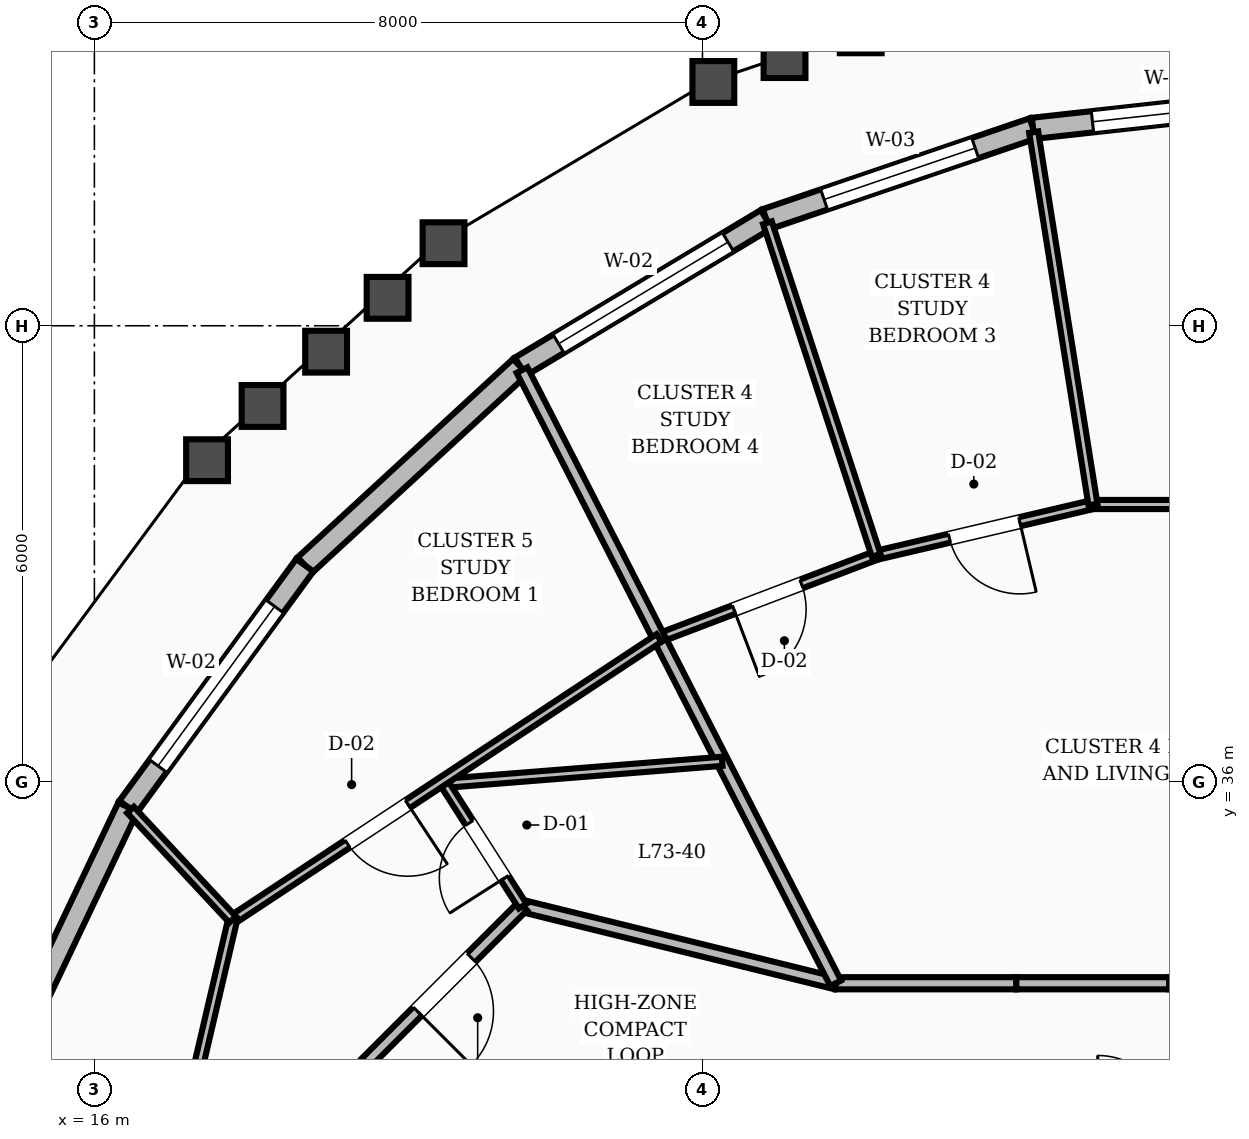
"""IFC4 building model, lengths in metres.
Left out: names, types, materials, properties, quantities, classifications, styles, units other than length and angle.
Written with IfcOpenShell. Run it as: python <this file> out.ifc"""

import sys

from ifc_helpers import new_model, si_unit, direction, frame, frame_2d, origin, place, context, subcontext, project, spatial, rectangle, extrude, element, fill, save


model = new_model("IFC4")
c1 = context("Model", 3, precision=1e-05, world=origin(), true_north=direction((0.0, 1.0)))
c2 = subcontext(c1, "Body", "Model", "MODEL_VIEW")
j1 = project(units=[si_unit("LENGTHUNIT", "METRE"), si_unit("PLANEANGLEUNIT", "RADIAN")], contexts=[c1])
p1 = place(None, origin())
s1 = spatial("IfcSite", under=j1, at=p1, CompositionType="ELEMENT")
p2 = place(p1, origin())
s2 = spatial("IfcBuilding", under=s1, at=p2, CompositionType="ELEMENT")
p3 = place(p2, frame((0.0, 0.0, 279.6)))
s3 = spatial("IfcBuildingStorey", under=s2, at=p3, CompositionType="ELEMENT", Elevation=279.6)
p4 = place(p3, frame((32.0, 45.0, 0.0), z_axis=(0.0, 0.0, 1.0), x_axis=(-0.993952444877, -0.10981137156, 0.0)))
e1 = element("IfcWall", 1, at=p4, inside=s3, PredefinedType="STANDARD", context=c2, shape_type="SweptSolid", body=[
    extrude(rectangle(XDim=3.673, YDim=0.28, at=frame_2d((1.836, 0.0))), origin(), (0.0, 0.0, 1.0), 2.88),
])
p5 = place(p4, frame((0.787, 0.0, 0.8)))
e2 = element("IfcOpeningElement", 2, at=p5, cuts=e1, PredefinedType="OPENING", context=c2, shape_type="SweptSolid", body=[
    extrude(rectangle(XDim=2.1, YDim=1.65, at=frame_2d((1.05, 0.825))), frame((0.0, 0.15, 0.0), z_axis=(0.0, -1.0, 0.0), x_axis=(1.0, 0.0, 0.0)), (0.0, 0.0, 1.0), 0.3),
])
p6 = place(p3, frame((28.349, 44.597, 0.0), z_axis=(0.0, 0.0, 1.0), x_axis=(-0.946642640744, -0.322285138854, 0.0)))
e3 = element("IfcWall", 3, at=p6, inside=s3, PredefinedType="STANDARD", context=c2, shape_type="SweptSolid", body=[
    extrude(rectangle(XDim=3.708, YDim=0.28, at=frame_2d((1.854, 0.0))), origin(), (0.0, 0.0, 1.0), 2.88),
])
p7 = place(p6, frame((0.804, 0.0, 0.8)))
e4 = element("IfcOpeningElement", 4, at=p7, cuts=e3, PredefinedType="OPENING", context=c2, shape_type="SweptSolid", body=[
    extrude(rectangle(XDim=2.1, YDim=1.65, at=frame_2d((1.05, 0.825))), frame((0.0, 0.15, 0.0), z_axis=(0.0, -1.0, 0.0), x_axis=(1.0, 0.0, 0.0)), (0.0, 0.0, 1.0), 0.3),
])
p8 = place(p3, frame((24.839, 43.402, 0.0), z_axis=(0.0, 0.0, 1.0), x_axis=(-0.857555727465, -0.514391071357, 0.0)))
e5 = element("IfcWall", 5, at=p8, inside=s3, PredefinedType="STANDARD", context=c2, shape_type="SweptSolid", body=[
    extrude(rectangle(XDim=3.773, YDim=0.28, at=frame_2d((1.886, 0.0))), origin(), (0.0, 0.0, 1.0), 2.88),
])
p9 = place(p8, frame((0.586, 0.0, 0.8)))
e6 = element("IfcOpeningElement", 6, at=p9, cuts=e5, PredefinedType="OPENING", context=c2, shape_type="SweptSolid", body=[
    extrude(rectangle(XDim=2.6, YDim=1.65, at=frame_2d((1.3, 0.825))), frame((0.0, 0.15, 0.0), z_axis=(0.0, -1.0, 0.0), x_axis=(1.0, 0.0, 0.0)), (0.0, 0.0, 1.0), 0.3),
])
p10 = place(p3, frame((21.604, 41.461, 0.0), z_axis=(0.0, 0.0, 1.0), x_axis=(-0.735545935602, -0.677474853127, 0.0)))
e7 = element("IfcWall", 7, at=p10, inside=s3, PredefinedType="STANDARD", context=c2, shape_type="SweptSolid", body=[
    extrude(rectangle(XDim=3.855, YDim=0.28, at=frame_2d((1.928, 0.0))), origin(), (0.0, 0.0, 1.0), 2.88),
])
p11 = place(p3, frame((18.768, 38.85, 0.0), z_axis=(0.0, 0.0, 1.0), x_axis=(-0.590275846693, -0.807201601095, 0.0)))
e8 = element("IfcWall", 8, at=p11, inside=s3, PredefinedType="STANDARD", context=c2, shape_type="SweptSolid", body=[
    extrude(rectangle(XDim=3.942, YDim=0.28, at=frame_2d((1.971, 0.0))), origin(), (0.0, 0.0, 1.0), 2.88),
])
p12 = place(p11, frame((0.671, 0.0, 0.8)))
e9 = element("IfcOpeningElement", 9, at=p12, cuts=e8, PredefinedType="OPENING", context=c2, shape_type="SweptSolid", body=[
    extrude(rectangle(XDim=2.6, YDim=1.65, at=frame_2d((1.3, 0.825))), frame((0.0, 0.15, 0.0), z_axis=(0.0, -1.0, 0.0), x_axis=(1.0, 0.0, 0.0)), (0.0, 0.0, 1.0), 0.3),
])
p13 = place(p3, frame((16.441, 35.667, 0.0), z_axis=(0.0, 0.0, 1.0), x_axis=(-0.430011346388, -0.902823483289, 0.0)))
e10 = element("IfcWall", 10, at=p13, inside=s3, PredefinedType="STANDARD", context=c2, shape_type="SweptSolid", body=[
    extrude(rectangle(XDim=4.021, YDim=0.28, at=frame_2d((2.011, 0.0))), origin(), (0.0, 0.0, 1.0), 2.88),
])
p14 = place(p3, frame((30.14, 33.35, 0.0), z_axis=(0.0, 0.0, 1.0), x_axis=(-1.0, 0.0, 0.0)))
e11 = element("IfcWall", 11, at=p14, inside=s3, PredefinedType="SOLIDWALL", context=c2, shape_type="SweptSolid", body=[
    extrude(rectangle(XDim=2.013, YDim=0.16, at=frame_2d((1.006, 0.0))), origin(), (0.0, 0.0, 1.0), 2.87),
])
p15 = place(p3, frame((28.127, 33.35, 0.0), z_axis=(0.0, 0.0, 1.0), x_axis=(-1.0, 0.0, 0.0)))
e12 = element("IfcWall", 12, at=p15, inside=s3, PredefinedType="SOLIDWALL", context=c2, shape_type="SweptSolid", body=[
    extrude(rectangle(XDim=2.375, YDim=0.16, at=frame_2d((1.188, 0.0))), origin(), (0.0, 0.0, 1.0), 2.87),
])
p16 = place(p3, frame((25.752, 33.35, 0.0), z_axis=(0.0, 0.0, 1.0), x_axis=(-0.970939799552, 0.239323850978, 0.0)))
e13 = element("IfcWall", 13, at=p16, inside=s3, PredefinedType="SOLIDWALL", context=c2, shape_type="SweptSolid", body=[
    extrude(rectangle(XDim=4.241, YDim=0.16, at=frame_2d((2.12, 0.0))), origin(), (0.0, 0.0, 1.0), 2.87),
])
p17 = place(p3, frame((21.635, 34.365, 0.0), z_axis=(0.0, 0.0, 1.0), x_axis=(-0.707106781187, -0.707106781187, 0.0)))
e14 = element("IfcWall", 14, at=p17, inside=s3, PredefinedType="SOLIDWALL", context=c2, shape_type="SweptSolid", body=[
    extrude(rectangle(XDim=2.916, YDim=0.16, at=frame_2d((1.458, 0.0))), origin(), (0.0, 0.0, 1.0), 2.87),
])
p18 = place(p17, frame((0.958, 0.0, 0.0)))
e15 = element("IfcOpeningElement", 15, at=p18, cuts=e14, PredefinedType="OPENING", context=c2, shape_type="SweptSolid", body=[
    extrude(rectangle(XDim=1.0, YDim=2.1, at=frame_2d((0.5, 1.05))), frame((0.0, 0.09, 0.0), z_axis=(0.0, -1.0, 0.0), x_axis=(1.0, 0.0, 0.0)), (0.0, 0.0, 1.0), 0.18),
])
p19 = place(p3, frame((34.863, 39.648, 0.0), z_axis=(0.0, 0.0, 1.0), x_axis=(-1.0, 0.0, 0.0)))
e16 = element("IfcWall", 16, at=p19, inside=s3, PredefinedType="PARTITIONING", context=c2, shape_type="SweptSolid", body=[
    extrude(rectangle(XDim=5.726, YDim=0.12, at=frame_2d((2.863, 0.0))), origin(), (0.0, 0.0, 1.0), 2.87),
])
p20 = place(p19, frame((2.388, 0.0, 0.0)))
e17 = element("IfcOpeningElement", 17, at=p20, cuts=e16, PredefinedType="OPENING", context=c2, shape_type="SweptSolid", body=[
    extrude(rectangle(XDim=0.95, YDim=2.1, at=frame_2d((0.475, 1.05))), frame((0.0, 0.07, 0.0), z_axis=(0.0, -1.0, 0.0), x_axis=(1.0, 0.0, 0.0)), (0.0, 0.0, 1.0), 0.14),
])
p21 = place(p3, frame((29.137, 39.648, 0.0), z_axis=(0.0, 0.0, 1.0), x_axis=(-0.973528560289, -0.228565400489, 0.0)))
e18 = element("IfcWall", 18, at=p21, inside=s3, PredefinedType="PARTITIONING", context=c2, shape_type="SweptSolid", body=[
    extrude(rectangle(XDim=2.929, YDim=0.12, at=frame_2d((1.464, 0.0))), origin(), (0.0, 0.0, 1.0), 2.87),
])
p22 = place(p21, frame((0.99, 0.0, 0.0)))
e19 = element("IfcOpeningElement", 19, at=p22, cuts=e18, PredefinedType="OPENING", context=c2, shape_type="SweptSolid", body=[
    extrude(rectangle(XDim=0.95, YDim=2.1, at=frame_2d((0.475, 1.05))), frame((0.0, 0.07, 0.0), z_axis=(0.0, -1.0, 0.0), x_axis=(1.0, 0.0, 0.0)), (0.0, 0.0, 1.0), 0.14),
])
p23 = place(p3, frame((29.137, 39.648, 0.0), z_axis=(0.0, 0.0, 1.0), x_axis=(-0.157236134309, 0.98756103511, 0.0)))
e20 = element("IfcWall", 20, at=p23, inside=s3, PredefinedType="PARTITIONING", context=c2, shape_type="SweptSolid", body=[
    extrude(rectangle(XDim=4.961, YDim=0.12, at=frame_2d((2.48, 0.0))), origin(), (0.0, 0.0, 1.0), 2.87),
])
p24 = place(p3, frame((26.286, 38.979, 0.0), z_axis=(0.0, 0.0, 1.0), x_axis=(-0.934660984689, -0.355540213901, 0.0)))
e21 = element("IfcWall", 21, at=p24, inside=s3, PredefinedType="PARTITIONING", context=c2, shape_type="SweptSolid", body=[
    extrude(rectangle(XDim=3.056, YDim=0.12, at=frame_2d((1.528, 0.0))), origin(), (0.0, 0.0, 1.0), 2.87),
])
p25 = place(p24, frame((1.053, 0.0, 0.0)))
e22 = element("IfcOpeningElement", 22, at=p25, cuts=e21, PredefinedType="OPENING", context=c2, shape_type="SweptSolid", body=[
    extrude(rectangle(XDim=0.95, YDim=2.1, at=frame_2d((0.475, 1.05))), frame((0.0, 0.07, 0.0), z_axis=(0.0, -1.0, 0.0), x_axis=(1.0, 0.0, 0.0)), (0.0, 0.0, 1.0), 0.14),
])
p26 = place(p3, frame((26.286, 38.979, 0.0), z_axis=(0.0, 0.0, 1.0), x_axis=(-0.310924966345, 0.95043446134, 0.0)))
e23 = element("IfcWall", 23, at=p26, inside=s3, PredefinedType="PARTITIONING", context=c2, shape_type="SweptSolid", body=[
    extrude(rectangle(XDim=4.604, YDim=0.12, at=frame_2d((2.302, 0.0))), origin(), (0.0, 0.0, 1.0), 2.87),
])
p27 = place(p3, frame((25.752, 33.35, 0.0), z_axis=(0.0, 0.0, 1.0), x_axis=(-0.455343199474, 0.890315994854, 0.0)))
e24 = element("IfcWall", 24, at=p27, inside=s3, PredefinedType="SOLIDWALL", context=c2, shape_type="SweptSolid", body=[
    extrude(rectangle(XDim=9.061, YDim=0.16, at=frame_2d((4.53, 0.0))), origin(), (0.0, 0.0, 1.0), 2.87),
])
p28 = place(p3, frame((24.259, 36.27, 0.0), z_axis=(0.0, 0.0, 1.0), x_axis=(-0.996857888432, -0.079210796423, 0.0)))
e25 = element("IfcWall", 25, at=p28, inside=s3, PredefinedType="PARTITIONING", context=c2, shape_type="SweptSolid", body=[
    extrude(rectangle(XDim=3.668, YDim=0.12, at=frame_2d((1.834, 0.0))), origin(), (0.0, 0.0, 1.0), 2.87),
])
p29 = place(p3, frame((21.635, 34.365, 0.0), z_axis=(0.0, 0.0, 1.0), x_axis=(-0.538663184237, 0.842521200889, 0.0)))
e26 = element("IfcWall", 26, at=p29, inside=s3, PredefinedType="PARTITIONING", context=c2, shape_type="SweptSolid", body=[
    extrude(rectangle(XDim=1.916, YDim=0.12, at=frame_2d((0.958, 0.0))), origin(), (0.0, 0.0, 1.0), 2.87),
])
p30 = place(p29, frame((0.44, 0.0, 0.0)))
e27 = element("IfcOpeningElement", 27, at=p30, cuts=e26, PredefinedType="OPENING", context=c2, shape_type="SweptSolid", body=[
    extrude(rectangle(XDim=0.86, YDim=2.1, at=frame_2d((0.43, 1.05))), frame((0.0, 0.07, 0.0), z_axis=(0.0, -1.0, 0.0), x_axis=(1.0, 0.0, 0.0)), (0.0, 0.0, 1.0), 0.14),
])
p31 = place(p3, frame((23.429, 37.892, 0.0), z_axis=(0.0, 0.0, 1.0), x_axis=(-0.834428061238, -0.551116875643, 0.0)))
e28 = element("IfcWall", 28, at=p31, inside=s3, PredefinedType="PARTITIONING", context=c2, shape_type="SweptSolid", body=[
    extrude(rectangle(XDim=6.723, YDim=0.12, at=frame_2d((3.362, 0.0))), origin(), (0.0, 0.0, 1.0), 2.87),
])
p32 = place(p31, frame((3.963, 0.0, 0.0)))
e29 = element("IfcOpeningElement", 29, at=p32, cuts=e28, PredefinedType="OPENING", context=c2, shape_type="SweptSolid", body=[
    extrude(rectangle(XDim=0.95, YDim=2.1, at=frame_2d((0.475, 1.05))), frame((0.0, 0.07, 0.0), z_axis=(0.0, -1.0, 0.0), x_axis=(1.0, 0.0, 0.0)), (0.0, 0.0, 1.0), 0.14),
])
p33 = place(p3, frame((17.819, 34.187, 0.0), z_axis=(0.0, 0.0, 1.0), x_axis=(-0.22738655048, -0.973804578271, 0.0)))
e30 = element("IfcWall", 30, at=p33, inside=s3, PredefinedType="PARTITIONING", context=c2, shape_type="SweptSolid", body=[
    extrude(rectangle(XDim=6.983, YDim=0.12, at=frame_2d((3.492, 0.0))), origin(), (0.0, 0.0, 1.0), 2.87),
])
p34 = place(p33, frame((3.017, 0.0, 0.0)))
e31 = element("IfcOpeningElement", 31, at=p34, cuts=e30, PredefinedType="OPENING", context=c2, shape_type="SweptSolid", body=[
    extrude(rectangle(XDim=0.95, YDim=2.1, at=frame_2d((0.475, 1.05))), frame((0.0, 0.07, 0.0), z_axis=(0.0, -1.0, 0.0), x_axis=(1.0, 0.0, 0.0)), (0.0, 0.0, 1.0), 0.14),
])
p35 = place(p3, frame((17.819, 34.187, 0.0), z_axis=(0.0, 0.0, 1.0), x_axis=(-0.681404809589, 0.73190674643, 0.0)))
e32 = element("IfcWall", 32, at=p35, inside=s3, PredefinedType="PARTITIONING", context=c2, shape_type="SweptSolid", body=[
    extrude(rectangle(XDim=1.972, YDim=0.12, at=frame_2d((0.986, 0.0))), origin(), (0.0, 0.0, 1.0), 2.87),
])
p36 = place(p5, origin())
e33 = element("IfcWindow", 33, at=p36, inside=s3, PartitioningType="SINGLE_PANEL", PredefinedType="WINDOW", context=c2, shape_type="SweptSolid", body=[
    extrude(rectangle(XDim=2.1, YDim=1.65, at=frame_2d((1.05, 0.825))), frame((0.0, 0.03, 0.0), z_axis=(0.0, -1.0, 0.0), x_axis=(1.0, 0.0, 0.0)), (0.0, 0.0, 1.0), 0.06),
])
fill(e2, e33)
p37 = place(p7, origin())
e34 = element("IfcWindow", 34, at=p37, inside=s3, PartitioningType="SINGLE_PANEL", PredefinedType="WINDOW", context=c2, shape_type="SweptSolid", body=[
    extrude(rectangle(XDim=2.1, YDim=1.65, at=frame_2d((1.05, 0.825))), frame((0.0, 0.03, 0.0), z_axis=(0.0, -1.0, 0.0), x_axis=(1.0, 0.0, 0.0)), (0.0, 0.0, 1.0), 0.06),
])
fill(e4, e34)
p38 = place(p9, origin())
e35 = element("IfcWindow", 35, at=p38, inside=s3, PartitioningType="SINGLE_PANEL", PredefinedType="WINDOW", context=c2, shape_type="SweptSolid", body=[
    extrude(rectangle(XDim=2.6, YDim=1.65, at=frame_2d((1.3, 0.825))), frame((0.0, 0.03, 0.0), z_axis=(0.0, -1.0, 0.0), x_axis=(1.0, 0.0, 0.0)), (0.0, 0.0, 1.0), 0.06),
])
fill(e6, e35)
p39 = place(p12, origin())
e36 = element("IfcWindow", 36, at=p39, inside=s3, PartitioningType="SINGLE_PANEL", PredefinedType="WINDOW", context=c2, shape_type="SweptSolid", body=[
    extrude(rectangle(XDim=2.6, YDim=1.65, at=frame_2d((1.3, 0.825))), frame((0.0, 0.03, 0.0), z_axis=(0.0, -1.0, 0.0), x_axis=(1.0, 0.0, 0.0)), (0.0, 0.0, 1.0), 0.06),
])
fill(e9, e36)
p40 = place(p22, origin())
e37 = element("IfcDoor", 37, at=p40, inside=s3, OperationType="SINGLE_SWING_LEFT", PredefinedType="DOOR", context=c2, shape_type="SweptSolid", body=[
    extrude(rectangle(XDim=0.95, YDim=2.1, at=frame_2d((0.475, 1.05))), frame((0.0, 0.025, 0.0), z_axis=(0.0, -1.0, 0.0), x_axis=(1.0, 0.0, 0.0)), (0.0, 0.0, 1.0), 0.05),
])
fill(e19, e37)
p41 = place(p25, origin())
e38 = element("IfcDoor", 38, at=p41, inside=s3, OperationType="SINGLE_SWING_RIGHT", PredefinedType="DOOR", context=c2, shape_type="SweptSolid", body=[
    extrude(rectangle(XDim=0.95, YDim=2.1, at=frame_2d((0.475, 1.05))), frame((0.0, 0.025, 0.0), z_axis=(0.0, -1.0, 0.0), x_axis=(1.0, 0.0, 0.0)), (0.0, 0.0, 1.0), 0.05),
])
fill(e22, e38)
p42 = place(p30, origin())
e39 = element("IfcDoor", 39, at=p42, inside=s3, OperationType="SINGLE_SWING_LEFT", PredefinedType="DOOR", context=c2, shape_type="SweptSolid", body=[
    extrude(rectangle(XDim=0.86, YDim=2.1, at=frame_2d((0.43, 1.05))), frame((0.0, 0.025, 0.0), z_axis=(0.0, -1.0, 0.0), x_axis=(1.0, 0.0, 0.0)), (0.0, 0.0, 1.0), 0.05),
])
fill(e27, e39)
p43 = place(p18, origin())
e40 = element("IfcDoor", 40, at=p43, inside=s3, OperationType="SINGLE_SWING_RIGHT", PredefinedType="DOOR", context=c2, shape_type="SweptSolid", body=[
    extrude(rectangle(XDim=1.0, YDim=2.1, at=frame_2d((0.5, 1.05))), frame((0.0, 0.025, 0.0), z_axis=(0.0, -1.0, 0.0), x_axis=(1.0, 0.0, 0.0)), (0.0, 0.0, 1.0), 0.05),
])
fill(e15, e40)
p44 = place(p32, origin())
e41 = element("IfcDoor", 41, at=p44, inside=s3, OperationType="SINGLE_SWING_LEFT", PredefinedType="DOOR", context=c2, shape_type="SweptSolid", body=[
    extrude(rectangle(XDim=0.95, YDim=2.1, at=frame_2d((0.475, 1.05))), frame((0.0, 0.025, 0.0), z_axis=(0.0, -1.0, 0.0), x_axis=(1.0, 0.0, 0.0)), (0.0, 0.0, 1.0), 0.05),
])
fill(e29, e41)
save(model, sys.argv[1])
